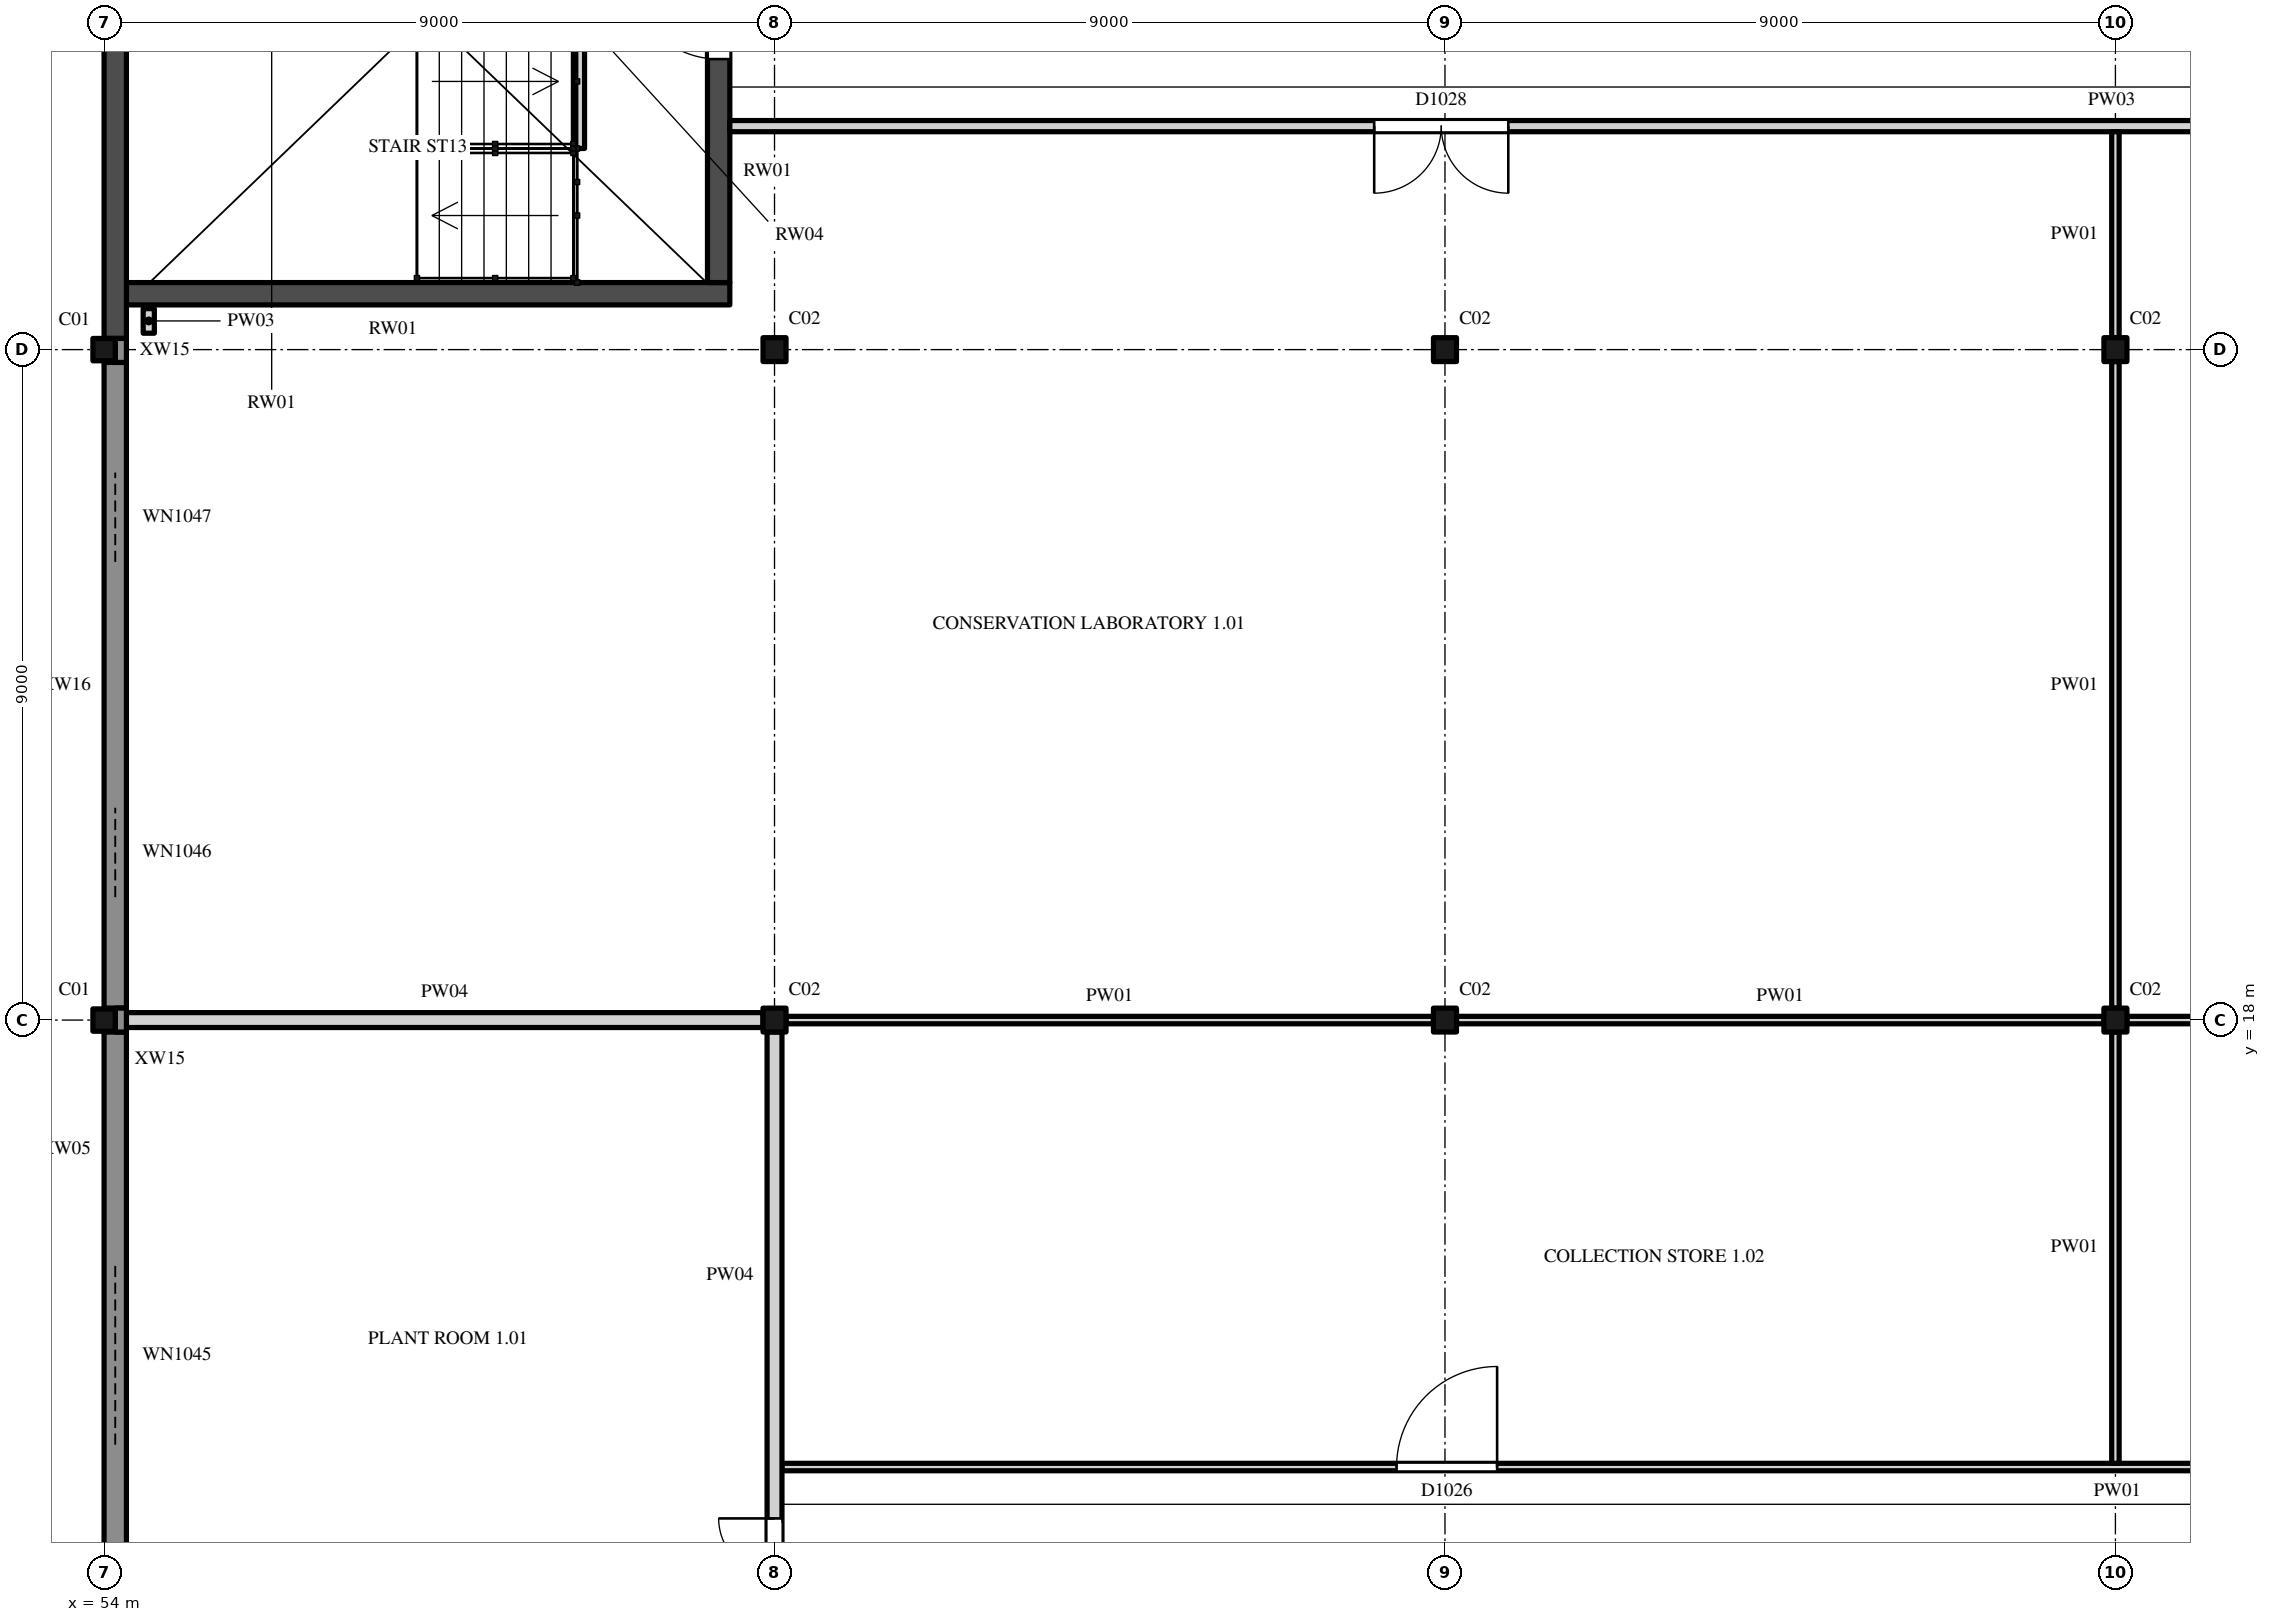
"""IFC4 building model, lengths in metres.
Left out: names, types, materials, properties, quantities, classifications, styles, units other than length and angle.
Written with IfcOpenShell. Run it as: python <this file> out.ifc"""

import sys

from ifc_helpers import new_model, si_unit, direction, frame, frame_2d, origin, origin_2d, place, context, subcontext, project, spatial, rectangle, hollow_rectangle, i_section, extrude, element, fill, save


model = new_model("IFC4")
c1 = context("Model", 3, precision=1e-05, world=origin(), true_north=direction((0.0, 1.0)))
c2 = subcontext(c1, "Body", "Model", "MODEL_VIEW")
j1 = project(units=[si_unit("LENGTHUNIT", "METRE"), si_unit("PLANEANGLEUNIT", "RADIAN")], contexts=[c1])
p1 = place(None, origin())
s1 = spatial("IfcSite", under=j1, at=p1, CompositionType="ELEMENT")
p2 = place(p1, origin())
s2 = spatial("IfcBuilding", under=s1, at=p2, CompositionType="ELEMENT")
p3 = place(p2, frame((0.0, 0.0, 6.0)))
s3 = spatial("IfcBuildingStorey", under=s2, at=p3, CompositionType="ELEMENT", Elevation=6.0)
p4 = place(p3, frame((54.0, 18.0, 0.0), z_axis=(0.0, 0.0, 1.0), x_axis=(1.0, 0.0, 0.0)))
e1 = element("IfcColumn", 1, at=p4, inside=s3, PredefinedType="COLUMN", context=c2, shape_type="SweptSolid", body=[
    extrude(hollow_rectangle(XDim=0.3, YDim=0.3, WallThickness=0.012, InnerFilletRadius=0.019, OuterFilletRadius=0.031, at=origin_2d()), origin(), (0.0, 0.0, 1.0), 5.0),
])
for number, where, z_axis, x_axis in (
    (2, (63.0, 18.0, 0.0), (0.0, 0.0, 1.0), (1.0, 0.0, 0.0)),
    (3, (72.0, 18.0, 0.0), (0.0, 0.0, 1.0), (1.0, 0.0, 0.0)),
    (4, (81.0, 18.0, 0.0), (0.0, 0.0, 1.0), (1.0, 0.0, 0.0)),
):
    element("IfcColumn", number, at=place(p3, frame(where, z_axis=z_axis, x_axis=x_axis)), inside=s3, PredefinedType="COLUMN", context=c2, shape_type="SweptSolid", body=[
        extrude(i_section(OverallWidth=0.309, OverallDepth=0.321, WebThickness=0.014, FlangeThickness=0.022, FilletRadius=0.017, at=origin_2d()), origin(), (0.0, 0.0, 1.0), 5.0),
    ])
p5 = place(p3, frame((54.0, 27.0, 0.0), z_axis=(0.0, 0.0, 1.0), x_axis=(1.0, 0.0, 0.0)))
e5 = element("IfcColumn", 5, at=p5, inside=s3, PredefinedType="COLUMN", context=c2, shape_type="SweptSolid", body=[
    extrude(hollow_rectangle(XDim=0.3, YDim=0.3, WallThickness=0.012, InnerFilletRadius=0.019, OuterFilletRadius=0.031, at=origin_2d()), origin(), (0.0, 0.0, 1.0), 5.0),
])
for number, where, z_axis, x_axis in (
    (6, (63.0, 27.0, 0.0), (0.0, 0.0, 1.0), (1.0, 0.0, 0.0)),
    (7, (72.0, 27.0, 0.0), (0.0, 0.0, 1.0), (1.0, 0.0, 0.0)),
    (8, (81.0, 27.0, 0.0), (0.0, 0.0, 1.0), (1.0, 0.0, 0.0)),
):
    element("IfcColumn", number, at=place(p3, frame(where, z_axis=z_axis, x_axis=x_axis)), inside=s3, PredefinedType="COLUMN", context=c2, shape_type="SweptSolid", body=[
        extrude(i_section(OverallWidth=0.309, OverallDepth=0.321, WebThickness=0.014, FlangeThickness=0.022, FilletRadius=0.017, at=origin_2d()), origin(), (0.0, 0.0, 1.0), 5.0),
    ])
p6 = place(p3, frame((54.3, 27.75, 0.0), z_axis=(0.0, 0.0, 1.0), x_axis=(1.0, 0.0, 0.0)))
e9 = element("IfcWall", 9, at=p6, inside=s3, PredefinedType="SHEAR", context=c2, shape_type="SweptSolid", body=[
    extrude(rectangle(XDim=8.1, YDim=0.3, at=frame_2d((4.05, 0.0))), origin(), (0.0, 0.0, 1.0), 5.0),
])
p7 = place(p3, frame((54.15, 27.15, 0.0), z_axis=(0.0, 0.0, 1.0), x_axis=(0.0, 1.0, 0.0)))
e10 = element("IfcWall", 10, at=p7, inside=s3, PredefinedType="SHEAR", context=c2, shape_type="SweptSolid", body=[
    extrude(rectangle(XDim=8.7, YDim=0.3, at=frame_2d((4.35, 0.0))), origin(), (0.0, 0.0, 1.0), 5.0),
])
p8 = place(p3, frame((62.25, 27.9, 0.0), z_axis=(0.0, 0.0, 1.0), x_axis=(0.0, 1.0, 0.0)))
e11 = element("IfcWall", 11, at=p8, inside=s3, PredefinedType="SHEAR", context=c2, shape_type="SweptSolid", body=[
    extrude(rectangle(XDim=7.2, YDim=0.3, at=frame_2d((3.6, 0.0))), origin(), (0.0, 0.0, 1.0), 5.0),
])
p9 = place(p8, frame((3.0, 0.0, 0.0)))
e12 = element("IfcOpeningElement", 12, at=p9, cuts=e11, PredefinedType="OPENING", context=c2, shape_type="SweptSolid", body=[
    extrude(rectangle(XDim=1.2, YDim=2.1, at=frame_2d((0.6, 1.05))), frame((0.0, 0.16, 0.0), z_axis=(0.0, -1.0, 0.0), x_axis=(1.0, 0.0, 0.0)), (0.0, 0.0, 1.0), 0.32),
])
p10 = place(p3, frame((60.375, 29.7, 0.0), z_axis=(0.0, 0.0, 1.0), x_axis=(0.0, 1.0, 0.0)))
e13 = element("IfcWall", 13, at=p10, inside=s3, PredefinedType="STANDARD", context=c2, shape_type="SweptSolid", body=[
    extrude(rectangle(XDim=3.6, YDim=0.15, at=frame_2d((1.8, 0.0))), origin(), (0.0, 0.0, 1.0), 2.3),
])
p11 = place(p3, frame((54.15, 9.172, 0.0), z_axis=(0.0, 0.0, 1.0), x_axis=(0.0, 1.0, 0.0)))
e14 = element("IfcWall", 14, at=p11, inside=s3, PredefinedType="SOLIDWALL", context=c2, shape_type="SweptSolid", body=[
    extrude(rectangle(XDim=8.667, YDim=0.3, at=frame_2d((4.333, 0.0))), origin(), (0.0, 0.0, 1.0), 4.297),
])
p12 = place(p11, frame((3.128, 0.0, 0.9)))
e15 = element("IfcOpeningElement", 15, at=p12, cuts=e14, PredefinedType="OPENING", context=c2, shape_type="SweptSolid", body=[
    extrude(rectangle(XDim=2.4, YDim=1.8, at=frame_2d((1.2, 0.9))), frame((0.0, 0.16, 0.0), z_axis=(0.0, -1.0, 0.0), x_axis=(1.0, 0.0, 0.0)), (0.0, 0.0, 1.0), 0.32),
])
p13 = place(p3, frame((54.15, 18.161, 0.0), z_axis=(0.0, 0.0, 1.0), x_axis=(0.0, 1.0, 0.0)))
e16 = element("IfcWall", 16, at=p13, inside=s3, PredefinedType="SOLIDWALL", context=c2, shape_type="SweptSolid", body=[
    extrude(rectangle(XDim=8.667, YDim=0.3, at=frame_2d((4.333, 0.0))), origin(), (0.0, 0.0, 1.0), 4.297),
])
p14 = place(p13, frame((1.489, 0.0, 1.2)))
e17 = element("IfcOpeningElement", 17, at=p14, cuts=e16, PredefinedType="OPENING", context=c2, shape_type="SweptSolid", body=[
    extrude(rectangle(XDim=1.2, YDim=1.5, at=frame_2d((0.6, 0.75))), frame((0.0, 0.16, 0.0), z_axis=(0.0, -1.0, 0.0), x_axis=(1.0, 0.0, 0.0)), (0.0, 0.0, 1.0), 0.32),
])
p15 = place(p13, frame((5.989, 0.0, 1.2)))
e18 = element("IfcOpeningElement", 18, at=p15, cuts=e16, PredefinedType="OPENING", context=c2, shape_type="SweptSolid", body=[
    extrude(rectangle(XDim=1.2, YDim=1.5, at=frame_2d((0.6, 0.75))), frame((0.0, 0.16, 0.0), z_axis=(0.0, -1.0, 0.0), x_axis=(1.0, 0.0, 0.0)), (0.0, 0.0, 1.0), 0.32),
])
p16 = place(p3, frame((54.225, 17.839, 0.0), z_axis=(0.0, 0.0, 1.0), x_axis=(0.0, 1.0, 0.0)))
e19 = element("IfcWall", 19, at=p16, inside=s3, PredefinedType="SOLIDWALL", context=c2, shape_type="SweptSolid", body=[
    extrude(rectangle(XDim=0.322, YDim=0.15, at=frame_2d((0.161, 0.0))), origin(), (0.0, 0.0, 1.0), 4.297),
])
p17 = place(p3, frame((54.225, 26.828, 0.0), z_axis=(0.0, 0.0, 1.0), x_axis=(0.0, 1.0, 0.0)))
e20 = element("IfcWall", 20, at=p17, inside=s3, PredefinedType="SOLIDWALL", context=c2, shape_type="SweptSolid", body=[
    extrude(rectangle(XDim=0.322, YDim=0.15, at=frame_2d((0.161, 0.0))), origin(), (0.0, 0.0, 1.0), 5.0),
])
p18 = place(p3, frame((63.1, 12.0, 0.0), z_axis=(0.0, 0.0, 1.0), x_axis=(1.0, 0.0, 0.0)))
e21 = element("IfcWall", 21, at=p18, inside=s3, PredefinedType="PARTITIONING", context=c2, shape_type="SweptSolid", body=[
    extrude(rectangle(XDim=35.95, YDim=0.1, at=frame_2d((17.975, 0.0))), origin(), (0.0, 0.0, 1.0), 4.419),
])
p19 = place(p18, frame((8.25, 0.0, 0.0)))
e22 = element("IfcOpeningElement", 22, at=p19, cuts=e21, PredefinedType="OPENING", context=c2, shape_type="SweptSolid", body=[
    extrude(rectangle(XDim=1.35, YDim=2.4, at=frame_2d((0.675, 1.2))), frame((0.0, 0.06, 0.0), z_axis=(0.0, -1.0, 0.0), x_axis=(1.0, 0.0, 0.0)), (0.0, 0.0, 1.0), 0.12),
])
p20 = place(p18, frame((26.25, 0.0, 0.0)))
e23 = element("IfcOpeningElement", 23, at=p20, cuts=e21, PredefinedType="OPENING", context=c2, shape_type="SweptSolid", body=[
    extrude(rectangle(XDim=1.35, YDim=2.4, at=frame_2d((0.675, 1.2))), frame((0.0, 0.06, 0.0), z_axis=(0.0, -1.0, 0.0), x_axis=(1.0, 0.0, 0.0)), (0.0, 0.0, 1.0), 0.12),
])
p21 = place(p3, frame((54.3, 18.0, 0.0), z_axis=(0.0, 0.0, 1.0), x_axis=(1.0, 0.0, 0.0)))
e24 = element("IfcWall", 24, at=p21, inside=s3, PredefinedType="PARTITIONING", context=c2, shape_type="SweptSolid", body=[
    extrude(rectangle(XDim=8.545, YDim=0.2, at=frame_2d((4.273, 0.0))), origin(), (0.0, 0.0, 1.0), 4.419),
])
for number, where, z_axis, x_axis in (
    (25, (63.155, 18.0, 0.0), (0.0, 0.0, 1.0), (1.0, 0.0, 0.0)),
    (26, (72.155, 18.0, 0.0), (0.0, 0.0, 1.0), (1.0, 0.0, 0.0)),
    (27, (81.155, 18.0, 0.0), (0.0, 0.0, 1.0), (1.0, 0.0, 0.0)),
):
    element("IfcWall", number, at=place(p3, frame(where, z_axis=z_axis, x_axis=x_axis)), inside=s3, PredefinedType="PARTITIONING", context=c2, shape_type="SweptSolid", body=[
        extrude(rectangle(XDim=8.691, YDim=0.1, at=frame_2d((4.345, 0.0))), origin(), (0.0, 0.0, 1.0), 4.419),
    ])
p22 = place(p3, frame((62.4, 30.0, 0.0), z_axis=(0.0, 0.0, 1.0), x_axis=(1.0, 0.0, 0.0)))
e28 = element("IfcWall", 28, at=p22, inside=s3, PredefinedType="PARTITIONING", context=c2, shape_type="SweptSolid", body=[
    extrude(rectangle(XDim=36.675, YDim=0.15, at=frame_2d((18.337, 0.0))), origin(), (0.0, 0.0, 1.0), 4.419),
])
p23 = place(p22, frame((8.65, 0.0, 0.0)))
e29 = element("IfcOpeningElement", 29, at=p23, cuts=e28, PredefinedType="OPENING", context=c2, shape_type="SweptSolid", body=[
    extrude(rectangle(XDim=1.8, YDim=2.1, at=frame_2d((0.9, 1.05))), frame((0.0, 0.085, 0.0), z_axis=(0.0, -1.0, 0.0), x_axis=(1.0, 0.0, 0.0)), (0.0, 0.0, 1.0), 0.17),
])
p24 = place(p22, frame((26.65, 0.0, 0.0)))
e30 = element("IfcOpeningElement", 30, at=p24, cuts=e28, PredefinedType="OPENING", context=c2, shape_type="SweptSolid", body=[
    extrude(rectangle(XDim=1.8, YDim=2.1, at=frame_2d((0.9, 1.05))), frame((0.0, 0.085, 0.0), z_axis=(0.0, -1.0, 0.0), x_axis=(1.0, 0.0, 0.0)), (0.0, 0.0, 1.0), 0.17),
])
p25 = place(p3, frame((54.6, 27.22, 0.0), z_axis=(0.0, 0.0, 1.0), x_axis=(0.0, 1.0, 0.0)))
e31 = element("IfcWall", 31, at=p25, inside=s3, PredefinedType="PARTITIONING", context=c2, shape_type="SweptSolid", body=[
    extrude(rectangle(XDim=0.33, YDim=0.15, at=frame_2d((0.165, 0.0))), origin(), (0.0, 0.0, 1.0), 4.825),
])
p26 = place(p3, frame((63.0, 9.16, 0.0), z_axis=(0.0, 0.0, 1.0), x_axis=(0.0, 1.0, 0.0)))
e32 = element("IfcWall", 32, at=p26, inside=s3, PredefinedType="PARTITIONING", context=c2, shape_type="SweptSolid", body=[
    extrude(rectangle(XDim=8.679, YDim=0.2, at=frame_2d((4.34, 0.0))), origin(), (0.0, 0.0, 1.0), 4.297),
])
p27 = place(p26, frame((0.65, 0.0, 0.0)))
e33 = element("IfcOpeningElement", 33, at=p27, cuts=e32, PredefinedType="OPENING", context=c2, shape_type="SweptSolid", body=[
    extrude(rectangle(XDim=1.5, YDim=2.4, at=frame_2d((0.75, 1.2))), frame((0.0, 0.11, 0.0), z_axis=(0.0, -1.0, 0.0), x_axis=(1.0, 0.0, 0.0)), (0.0, 0.0, 1.0), 0.22),
])
p28 = place(p3, frame((81.0, 12.05, 0.0), z_axis=(0.0, 0.0, 1.0), x_axis=(0.0, 1.0, 0.0)))
e34 = element("IfcWall", 34, at=p28, inside=s3, PredefinedType="PARTITIONING", context=c2, shape_type="SweptSolid", body=[
    extrude(rectangle(XDim=5.79, YDim=0.1, at=frame_2d((2.895, 0.0))), origin(), (0.0, 0.0, 1.0), 4.297),
])
p29 = place(p3, frame((81.0, 18.16, 0.0), z_axis=(0.0, 0.0, 1.0), x_axis=(0.0, 1.0, 0.0)))
e35 = element("IfcWall", 35, at=p29, inside=s3, PredefinedType="PARTITIONING", context=c2, shape_type="SweptSolid", body=[
    extrude(rectangle(XDim=8.679, YDim=0.1, at=frame_2d((4.34, 0.0))), origin(), (0.0, 0.0, 1.0), 4.297),
])
p30 = place(p3, frame((81.0, 27.16, 0.0), z_axis=(0.0, 0.0, 1.0), x_axis=(0.0, 1.0, 0.0)))
e36 = element("IfcWall", 36, at=p30, inside=s3, PredefinedType="PARTITIONING", context=c2, shape_type="SweptSolid", body=[
    extrude(rectangle(XDim=2.765, YDim=0.1, at=frame_2d((1.382, 0.0))), origin(), (0.0, 0.0, 1.0), 4.297),
])
p31 = place(p9, origin())
e37 = element("IfcDoor", 37, at=p31, inside=s3, OperationType="SINGLE_SWING_LEFT", PredefinedType="DOOR", context=c2, shape_type="SweptSolid", body=[
    extrude(rectangle(XDim=1.2, YDim=2.1, at=frame_2d((0.6, 1.05))), frame((0.0, 0.025, 0.0), z_axis=(0.0, -1.0, 0.0), x_axis=(1.0, 0.0, 0.0)), (0.0, 0.0, 1.0), 0.05),
])
fill(e12, e37)
p32 = place(p12, origin())
e38 = element("IfcWindow", 38, at=p32, inside=s3, PartitioningType="TRIPLE_PANEL_VERTICAL", PredefinedType="WINDOW", context=c2, shape_type="SweptSolid", body=[
    extrude(rectangle(XDim=2.4, YDim=1.8, at=frame_2d((1.2, 0.9))), frame((0.0, 0.03, 0.0), z_axis=(0.0, -1.0, 0.0), x_axis=(1.0, 0.0, 0.0)), (0.0, 0.0, 1.0), 0.06),
])
fill(e15, e38)
p33 = place(p14, origin())
e39 = element("IfcWindow", 39, at=p33, inside=s3, PartitioningType="SINGLE_PANEL", PredefinedType="WINDOW", context=c2, shape_type="SweptSolid", body=[
    extrude(rectangle(XDim=1.2, YDim=1.5, at=frame_2d((0.6, 0.75))), frame((0.0, 0.03, 0.0), z_axis=(0.0, -1.0, 0.0), x_axis=(1.0, 0.0, 0.0)), (0.0, 0.0, 1.0), 0.06),
])
fill(e17, e39)
p34 = place(p15, origin())
e40 = element("IfcWindow", 40, at=p34, inside=s3, PartitioningType="SINGLE_PANEL", PredefinedType="WINDOW", context=c2, shape_type="SweptSolid", body=[
    extrude(rectangle(XDim=1.2, YDim=1.5, at=frame_2d((0.6, 0.75))), frame((0.0, 0.03, 0.0), z_axis=(0.0, -1.0, 0.0), x_axis=(1.0, 0.0, 0.0)), (0.0, 0.0, 1.0), 0.06),
])
fill(e18, e40)
p35 = place(p27, origin())
e41 = element("IfcDoor", 41, at=p35, inside=s3, OperationType="DOUBLE_DOOR_SINGLE_SWING", PredefinedType="DOOR", context=c2, shape_type="SweptSolid", body=[
    extrude(rectangle(XDim=1.5, YDim=2.4, at=frame_2d((0.75, 1.2))), frame((0.0, 0.025, 0.0), z_axis=(0.0, -1.0, 0.0), x_axis=(1.0, 0.0, 0.0)), (0.0, 0.0, 1.0), 0.05),
])
fill(e33, e41)
p36 = place(p19, origin())
e42 = element("IfcDoor", 42, at=p36, inside=s3, OperationType="SINGLE_SWING_LEFT", PredefinedType="DOOR", context=c2, shape_type="SweptSolid", body=[
    extrude(rectangle(XDim=1.35, YDim=2.4, at=frame_2d((0.675, 1.2))), frame((0.0, 0.025, 0.0), z_axis=(0.0, -1.0, 0.0), x_axis=(1.0, 0.0, 0.0)), (0.0, 0.0, 1.0), 0.05),
])
fill(e22, e42)
p37 = place(p23, origin())
e43 = element("IfcDoor", 43, at=p37, inside=s3, OperationType="DOUBLE_DOOR_SINGLE_SWING", PredefinedType="DOOR", context=c2, shape_type="SweptSolid", body=[
    extrude(rectangle(XDim=1.8, YDim=2.1, at=frame_2d((0.9, 1.05))), frame((0.0, 0.025, 0.0), z_axis=(0.0, -1.0, 0.0), x_axis=(1.0, 0.0, 0.0)), (0.0, 0.0, 1.0), 0.05),
])
fill(e29, e43)
save(model, sys.argv[1])
